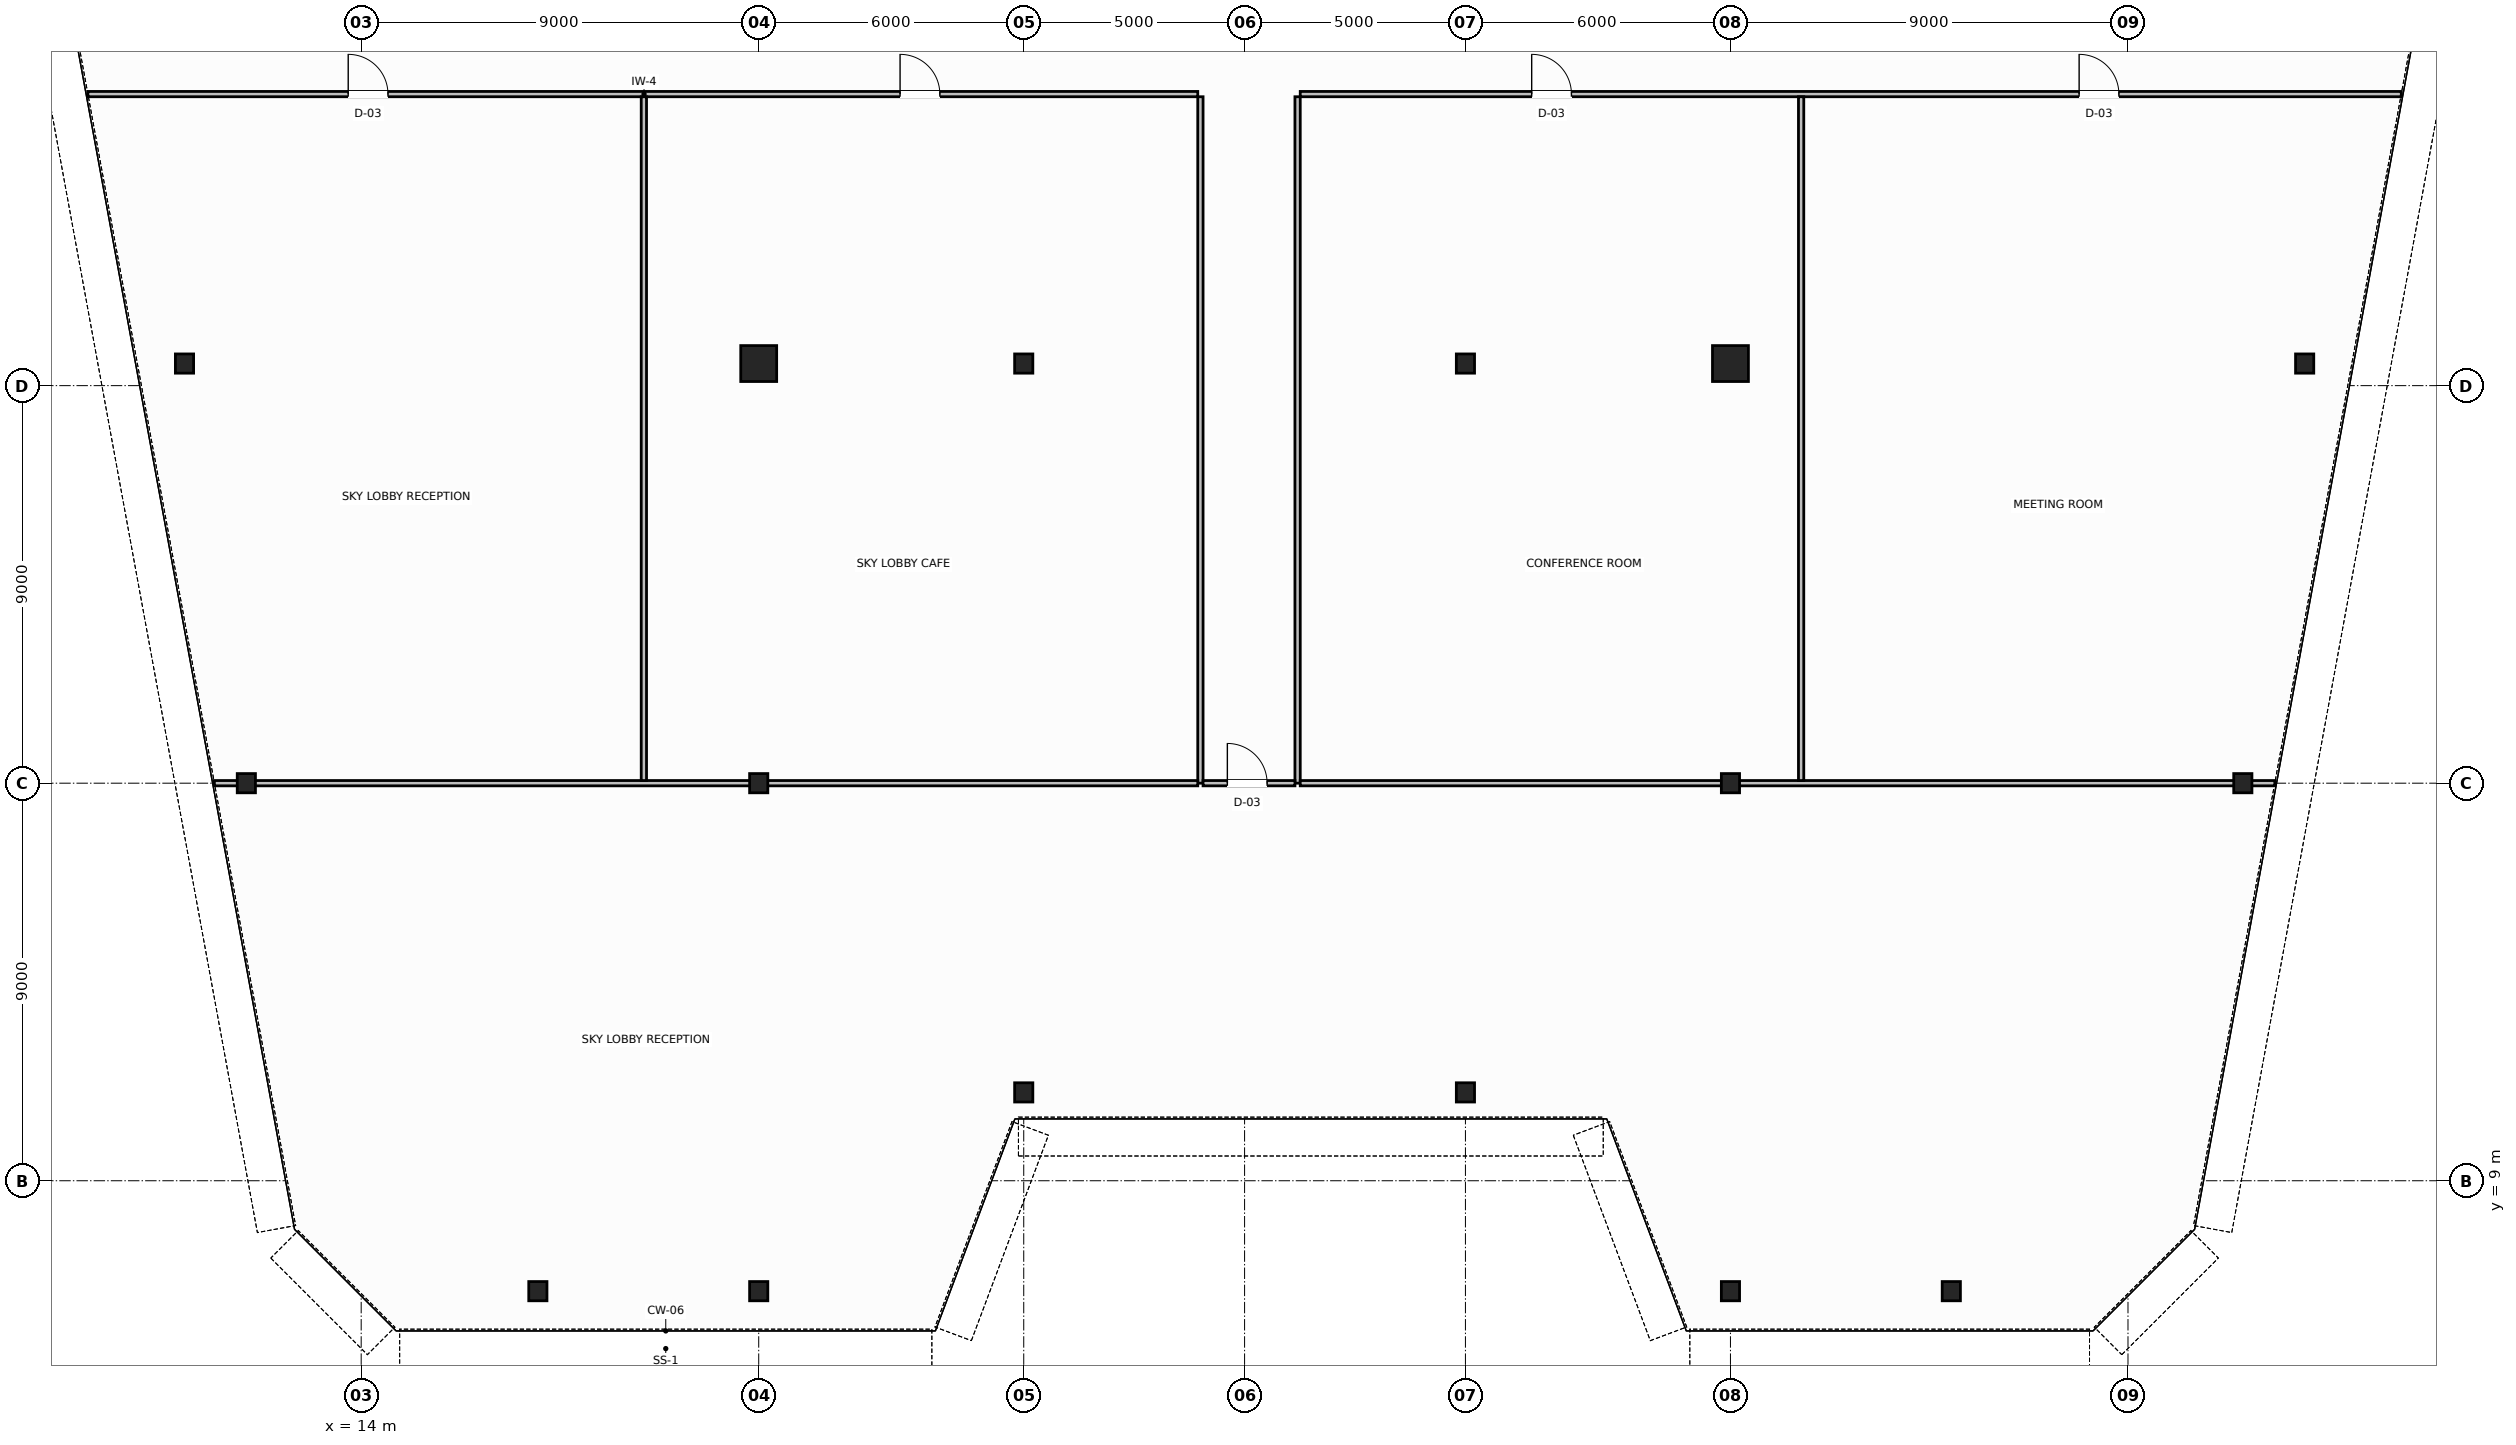
"""IFC4 building model, lengths in metres.
Left out: names, types, materials, properties, quantities, classifications, styles, units other than length and angle.
Written with IfcOpenShell. Run it as: python <this file> out.ifc"""

import sys

from ifc_helpers import new_model, si_unit, direction, frame, frame_2d, origin, origin_2d, place, context, subcontext, project, spatial, rectangle, hollow_circle, i_section, extrude, source, transform, mapped, element, fill, save


model = new_model("IFC4")
c1 = context("Model", 3, precision=1e-05, world=origin(), true_north=direction((0.0, 1.0)))
c2 = subcontext(c1, "Body", "Model", "MODEL_VIEW")
j1 = project(units=[si_unit("LENGTHUNIT", "METRE"), si_unit("PLANEANGLEUNIT", "RADIAN")], contexts=[c1])
p1 = place(None, origin())
s1 = spatial("IfcSite", under=j1, at=p1, CompositionType="ELEMENT")
p2 = place(p1, origin())
s2 = spatial("IfcBuilding", under=s1, at=p2, CompositionType="ELEMENT")
p3 = place(p2, frame((0.0, 0.0, 199.4)))
s3 = spatial("IfcBuildingStorey", under=s2, at=p3, CompositionType="ELEMENT", Elevation=199.4)
m1 = source(origin(), c2, "Body", "SweptSolid", [
    extrude(i_section(OverallWidth=0.412, OverallDepth=0.435, WebThickness=0.036, FlangeThickness=0.05, FilletRadius=0.015, at=origin_2d()), origin(), (0.0, 0.0, 1.0), 3.8),
])
for number, where, z_axis, x_axis in (
    (1, (10.0, 27.5, 0.0), (0.0, 0.0, 1.0), (1.0, 0.0, 0.0)),
    (2, (11.4, 18.0, 0.0), (0.0, 0.0, 1.0), (1.0, 0.0, 0.0)),
    (3, (58.0, 27.5, 0.0), (0.0, 0.0, 1.0), (1.0, 0.0, 0.0)),
    (4, (56.6, 18.0, 0.0), (0.0, 0.0, 1.0), (1.0, 0.0, 0.0)),
):
    element("IfcColumn", number, at=place(p3, frame(where, z_axis=z_axis, x_axis=x_axis)), inside=s3, PredefinedType="COLUMN", context=c2, shape_type="MappedRepresentation", body=[
        mapped(m1, transform((0.0, 0.0, 0.0), scale=1.0)),
    ])
m2 = source(origin(), c2, "Body", "SweptSolid", [
    extrude(hollow_circle(Radius=0.406, WallThickness=0.04, at=origin_2d()), origin(), (0.0, 0.0, 1.0), 3.8),
])
p4 = place(p3, frame((23.0, 27.5, 0.0), z_axis=(0.0, 0.0, 1.0), x_axis=(1.0, 0.0, 0.0)))
e5 = element("IfcColumn", 5, at=p4, inside=s3, PredefinedType="COLUMN", context=c2, shape_type="MappedRepresentation", body=[
    mapped(m2, transform((0.0, 0.0, 0.0), scale=1.0)),
])
m3 = source(origin(), c2, "Body", "SweptSolid", [
    extrude(i_section(OverallWidth=0.412, OverallDepth=0.435, WebThickness=0.036, FlangeThickness=0.05, FilletRadius=0.015, at=origin_2d()), origin(), (0.0, 0.0, 1.0), 3.8),
])
for number, where, z_axis, x_axis in (
    (6, (29.0, 27.5, 0.0), (0.0, 0.0, 1.0), (1.0, 0.0, 0.0)),
    (7, (39.0, 27.5, 0.0), (0.0, 0.0, 1.0), (1.0, 0.0, 0.0)),
):
    element("IfcColumn", number, at=place(p3, frame(where, z_axis=z_axis, x_axis=x_axis)), inside=s3, PredefinedType="COLUMN", context=c2, shape_type="MappedRepresentation", body=[
        mapped(m3, transform((0.0, 0.0, 0.0), scale=1.0)),
    ])
p5 = place(p3, frame((45.0, 27.5, 0.0), z_axis=(0.0, 0.0, 1.0), x_axis=(1.0, 0.0, 0.0)))
e8 = element("IfcColumn", 8, at=p5, inside=s3, PredefinedType="COLUMN", context=c2, shape_type="MappedRepresentation", body=[
    mapped(m2, transform((0.0, 0.0, 0.0), scale=1.0)),
])
for number, where, z_axis, x_axis in (
    (9, (23.0, 18.0, 0.0), (0.0, 0.0, 1.0), (1.0, 0.0, 0.0)),
    (10, (45.0, 18.0, 0.0), (0.0, 0.0, 1.0), (1.0, 0.0, 0.0)),
    (11, (18.0, 6.5, 0.0), (0.0, 0.0, 1.0), (1.0, 0.0, 0.0)),
    (12, (23.0, 6.5, 0.0), (0.0, 0.0, 1.0), (1.0, 0.0, 0.0)),
    (13, (29.0, 11.0, 0.0), (0.0, 0.0, 1.0), (1.0, 0.0, 0.0)),
    (14, (39.0, 11.0, 0.0), (0.0, 0.0, 1.0), (1.0, 0.0, 0.0)),
    (15, (45.0, 6.5, 0.0), (0.0, 0.0, 1.0), (1.0, 0.0, 0.0)),
    (16, (50.0, 6.5, 0.0), (0.0, 0.0, 1.0), (1.0, 0.0, 0.0)),
):
    element("IfcColumn", number, at=place(p3, frame(where, z_axis=z_axis, x_axis=x_axis)), inside=s3, PredefinedType="COLUMN", context=c2, shape_type="MappedRepresentation", body=[
        mapped(m3, transform((0.0, 0.0, 0.0), scale=1.0)),
    ])
p6 = place(p3, frame((7.812, 33.6, 0.0), z_axis=(0.0, 0.0, 1.0), x_axis=(1.0, 0.0, 0.0)))
e17 = element("IfcWall", 17, at=p6, inside=s3, PredefinedType="PARTITIONING", context=c2, shape_type="SweptSolid", body=[
    extrude(rectangle(XDim=25.127, YDim=0.12, at=frame_2d((12.564, 0.0))), origin(), (0.0, 0.0, 1.0), 3.58),
])
p7 = place(p6, frame((5.894, 0.0, 0.0)))
e18 = element("IfcOpeningElement", 18, at=p7, cuts=e17, PredefinedType="OPENING", context=c2, shape_type="SweptSolid", body=[
    extrude(rectangle(XDim=0.9, YDim=2.15, at=frame_2d((0.45, 1.075))), frame((0.0, 0.07, 0.0), z_axis=(0.0, -1.0, 0.0), x_axis=(1.0, 0.0, 0.0)), (0.0, 0.0, 1.0), 0.14),
])
p8 = place(p6, frame((18.388, 0.0, 0.0)))
e19 = element("IfcOpeningElement", 19, at=p8, cuts=e17, PredefinedType="OPENING", context=c2, shape_type="SweptSolid", body=[
    extrude(rectangle(XDim=0.9, YDim=2.15, at=frame_2d((0.45, 1.075))), frame((0.0, 0.07, 0.0), z_axis=(0.0, -1.0, 0.0), x_axis=(1.0, 0.0, 0.0)), (0.0, 0.0, 1.0), 0.14),
])
p9 = place(p3, frame((35.26, 33.6, 0.0), z_axis=(0.0, 0.0, 1.0), x_axis=(1.0, 0.0, 0.0)))
e20 = element("IfcWall", 20, at=p9, inside=s3, PredefinedType="PARTITIONING", context=c2, shape_type="SweptSolid", body=[
    extrude(rectangle(XDim=24.927, YDim=0.12, at=frame_2d((12.464, 0.0))), origin(), (0.0, 0.0, 1.0), 3.58),
])
p10 = place(p9, frame((5.24, 0.0, 0.0)))
e21 = element("IfcOpeningElement", 21, at=p10, cuts=e20, PredefinedType="OPENING", context=c2, shape_type="SweptSolid", body=[
    extrude(rectangle(XDim=0.9, YDim=2.15, at=frame_2d((0.45, 1.075))), frame((0.0, 0.07, 0.0), z_axis=(0.0, -1.0, 0.0), x_axis=(1.0, 0.0, 0.0)), (0.0, 0.0, 1.0), 0.14),
])
p11 = place(p9, frame((17.634, 0.0, 0.0)))
e22 = element("IfcOpeningElement", 22, at=p11, cuts=e20, PredefinedType="OPENING", context=c2, shape_type="SweptSolid", body=[
    extrude(rectangle(XDim=0.9, YDim=2.15, at=frame_2d((0.45, 1.075))), frame((0.0, 0.07, 0.0), z_axis=(0.0, -1.0, 0.0), x_axis=(1.0, 0.0, 0.0)), (0.0, 0.0, 1.0), 0.14),
])
for number, where, z_axis, x_axis in (
    (23, (33.0, 18.0, 0.0), (0.0, 0.0, 1.0), (0.0, 1.0, 0.0)),
    (24, (35.2, 18.0, 0.0), (0.0, 0.0, 1.0), (0.0, 1.0, 0.0)),
):
    element("IfcWall", number, at=place(p3, frame(where, z_axis=z_axis, x_axis=x_axis)), inside=s3, PredefinedType="PARTITIONING", context=c2, shape_type="SweptSolid", body=[
        extrude(rectangle(XDim=15.54, YDim=0.12, at=frame_2d((7.77, 0.0))), origin(), (0.0, 0.0, 1.0), 3.58),
    ])
p12 = place(p3, frame((33.06, 18.0, 0.0), z_axis=(0.0, 0.0, 1.0), x_axis=(1.0, 0.0, 0.0)))
e25 = element("IfcWall", 25, at=p12, inside=s3, PredefinedType="PARTITIONING", context=c2, shape_type="SweptSolid", body=[
    extrude(rectangle(XDim=2.08, YDim=0.12, at=frame_2d((1.04, 0.0))), origin(), (0.0, 0.0, 1.0), 2.97),
])
p13 = place(p12, frame((0.55, 0.0, 0.0)))
e26 = element("IfcOpeningElement", 26, at=p13, cuts=e25, PredefinedType="OPENING", context=c2, shape_type="SweptSolid", body=[
    extrude(rectangle(XDim=0.9, YDim=2.15, at=frame_2d((0.45, 1.075))), frame((0.0, 0.07, 0.0), z_axis=(0.0, -1.0, 0.0), x_axis=(1.0, 0.0, 0.0)), (0.0, 0.0, 1.0), 0.14),
])
p14 = place(p3, frame((10.677, 18.0, 0.0), z_axis=(0.0, 0.0, 1.0), x_axis=(1.0, 0.0, 0.0)))
e27 = element("IfcWall", 27, at=p14, inside=s3, PredefinedType="PARTITIONING", context=c2, shape_type="SweptSolid", body=[
    extrude(rectangle(XDim=22.263, YDim=0.12, at=frame_2d((11.132, 0.0))), origin(), (0.0, 0.0, 1.0), 2.97),
])
p15 = place(p3, frame((35.26, 18.0, 0.0), z_axis=(0.0, 0.0, 1.0), x_axis=(1.0, 0.0, 0.0)))
e28 = element("IfcWall", 28, at=p15, inside=s3, PredefinedType="PARTITIONING", context=c2, shape_type="SweptSolid", body=[
    extrude(rectangle(XDim=22.063, YDim=0.12, at=frame_2d((11.032, 0.0))), origin(), (0.0, 0.0, 1.0), 2.97),
])
for number, where, z_axis, x_axis in (
    (29, (20.4, 18.06, 0.0), (0.0, 0.0, 1.0), (0.0, 1.0, 0.0)),
    (30, (46.6, 18.06, 0.0), (0.0, 0.0, 1.0), (0.0, 1.0, 0.0)),
):
    element("IfcWall", number, at=place(p3, frame(where, z_axis=z_axis, x_axis=x_axis)), inside=s3, PredefinedType="PARTITIONING", context=c2, shape_type="SweptSolid", body=[
        extrude(rectangle(XDim=15.48, YDim=0.12, at=frame_2d((7.74, 0.0))), origin(), (0.0, 0.0, 1.0), 3.58),
    ])
m4 = source(origin(), c2, "Body", "SweptSolid", [
    extrude(rectangle(XDim=0.9, YDim=2.15, at=frame_2d((0.45, 1.075))), frame((0.0, 0.025, 0.0), z_axis=(0.0, -1.0, 0.0), x_axis=(1.0, 0.0, 0.0)), (0.0, 0.0, 1.0), 0.05),
])
p16 = place(p13, origin())
e31 = element("IfcDoor", 31, at=p16, inside=s3, OperationType="SINGLE_SWING_LEFT", PredefinedType="DOOR", context=c2, shape_type="MappedRepresentation", body=[
    mapped(m4, transform((0.0, 0.0, 0.0), scale=1.0)),
])
fill(e26, e31)
p17 = place(p7, origin())
e32 = element("IfcDoor", 32, at=p17, inside=s3, OperationType="SINGLE_SWING_LEFT", PredefinedType="DOOR", context=c2, shape_type="MappedRepresentation", body=[
    mapped(m4, transform((0.0, 0.0, 0.0), scale=1.0)),
])
fill(e18, e32)
p18 = place(p8, origin())
e33 = element("IfcDoor", 33, at=p18, inside=s3, OperationType="SINGLE_SWING_RIGHT", PredefinedType="DOOR", context=c2, shape_type="MappedRepresentation", body=[
    mapped(m4, transform((0.0, 0.0, 0.0), scale=1.0)),
])
fill(e19, e33)
p19 = place(p10, origin())
e34 = element("IfcDoor", 34, at=p19, inside=s3, OperationType="SINGLE_SWING_RIGHT", PredefinedType="DOOR", context=c2, shape_type="MappedRepresentation", body=[
    mapped(m4, transform((0.0, 0.0, 0.0), scale=1.0)),
])
fill(e21, e34)
p20 = place(p11, origin())
e35 = element("IfcDoor", 35, at=p20, inside=s3, OperationType="SINGLE_SWING_LEFT", PredefinedType="DOOR", context=c2, shape_type="MappedRepresentation", body=[
    mapped(m4, transform((0.0, 0.0, 0.0), scale=1.0)),
])
fill(e22, e35)
save(model, sys.argv[1])
